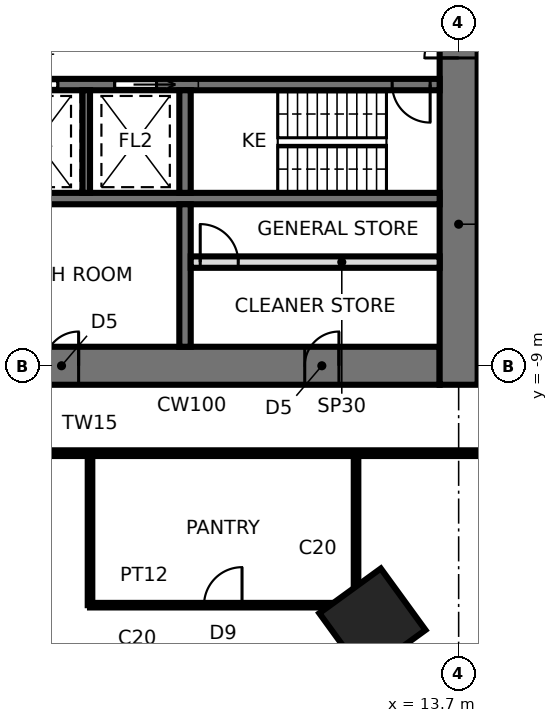
"""IFC4 building model, lengths in metres.
Left out: names, types, materials, properties, quantities, classifications, styles, units other than length and angle.
Written with IfcOpenShell. Run it as: python <this file> out.ifc"""

import sys

from ifc_helpers import new_model, si_unit, direction, frame, frame_2d, origin, origin_2d, place, context, subcontext, project, spatial, rectangle, extrude, element, fill, save


model = new_model("IFC4")
c1 = context("Model", 3, precision=1e-05, world=origin(), true_north=direction((0.0, 1.0)))
c2 = subcontext(c1, "Body", "Model", "MODEL_VIEW")
j1 = project(units=[si_unit("LENGTHUNIT", "METRE"), si_unit("PLANEANGLEUNIT", "RADIAN")], contexts=[c1])
p1 = place(None, origin())
s1 = spatial("IfcSite", under=j1, at=p1, CompositionType="ELEMENT")
p2 = place(p1, origin())
s2 = spatial("IfcBuilding", under=s1, at=p2, CompositionType="ELEMENT")
p3 = place(p2, frame((0.0, 0.0, 32.2)))
s3 = spatial("IfcBuildingStorey", under=s2, at=p3, CompositionType="ELEMENT", Elevation=32.2)
p4 = place(p3, frame((11.43, -15.733, 0.0), z_axis=(0.0, 0.0, 1.0), x_axis=(0.587785252292, -0.809016994375, 0.0)))
e1 = element("IfcColumn", 1, at=p4, inside=s3, PredefinedType="COLUMN", context=c2, shape_type="SweptSolid", body=[
    extrude(rectangle(XDim=2.0, YDim=2.0, at=origin_2d()), origin(), (0.0, 0.0, 1.0), 4.2),
])
p5 = place(p3, frame((-13.2, -9.0, 0.0), z_axis=(0.0, 0.0, 1.0), x_axis=(1.0, 0.0, 0.0)))
e2 = element("IfcWall", 2, at=p5, inside=s3, PredefinedType="SHEAR", context=c2, shape_type="SweptSolid", body=[
    extrude(rectangle(XDim=26.4, YDim=1.0, at=frame_2d((13.2, 0.0))), origin(), (0.0, 0.0, 1.0), 4.2),
])
p6 = place(p5, frame((2.65, 0.0, 0.0)))
e3 = element("IfcOpeningElement", 3, at=p6, cuts=e2, PredefinedType="OPENING", context=c2, shape_type="SweptSolid", body=[
    extrude(rectangle(XDim=0.9, YDim=2.1, at=frame_2d((0.45, 1.05))), frame((0.0, 0.51, 0.0), z_axis=(0.0, -1.0, 0.0), x_axis=(1.0, 0.0, 0.0)), (0.0, 0.0, 1.0), 1.02),
])
p7 = place(p5, frame((9.5, 0.0, 0.0)))
e4 = element("IfcOpeningElement", 4, at=p7, cuts=e2, PredefinedType="OPENING", context=c2, shape_type="SweptSolid", body=[
    extrude(rectangle(XDim=0.9, YDim=2.1, at=frame_2d((0.45, 1.05))), frame((0.0, 0.51, 0.0), z_axis=(0.0, -1.0, 0.0), x_axis=(1.0, 0.0, 0.0)), (0.0, 0.0, 1.0), 1.02),
])
p8 = place(p5, frame((16.0, 0.0, 0.0)))
e5 = element("IfcOpeningElement", 5, at=p8, cuts=e2, PredefinedType="OPENING", context=c2, shape_type="SweptSolid", body=[
    extrude(rectangle(XDim=0.9, YDim=2.1, at=frame_2d((0.45, 1.05))), frame((0.0, 0.51, 0.0), z_axis=(0.0, -1.0, 0.0), x_axis=(1.0, 0.0, 0.0)), (0.0, 0.0, 1.0), 1.02),
])
p9 = place(p5, frame((22.85, 0.0, 0.0)))
e6 = element("IfcOpeningElement", 6, at=p9, cuts=e2, PredefinedType="OPENING", context=c2, shape_type="SweptSolid", body=[
    extrude(rectangle(XDim=0.9, YDim=2.1, at=frame_2d((0.45, 1.05))), frame((0.0, 0.51, 0.0), z_axis=(0.0, -1.0, 0.0), x_axis=(1.0, 0.0, 0.0)), (0.0, 0.0, 1.0), 1.02),
])
p10 = place(p3, frame((13.7, -9.5, 0.0), z_axis=(0.0, 0.0, 1.0), x_axis=(0.0, 1.0, 0.0)))
e7 = element("IfcWall", 7, at=p10, inside=s3, PredefinedType="SHEAR", context=c2, shape_type="SweptSolid", body=[
    extrude(rectangle(XDim=19.0, YDim=1.0, at=frame_2d((9.5, 0.0))), origin(), (0.0, 0.0, 1.0), 4.2),
])
p11 = place(p10, frame((8.6, 0.0, 0.0)))
e8 = element("IfcOpeningElement", 8, at=p11, cuts=e7, PredefinedType="OPENING", context=c2, shape_type="SweptSolid", body=[
    extrude(rectangle(XDim=1.8, YDim=2.4, at=frame_2d((0.9, 1.2))), frame((0.0, 0.51, 0.0), z_axis=(0.0, -1.0, 0.0), x_axis=(1.0, 0.0, 0.0)), (0.0, 0.0, 1.0), 1.02),
])
p12 = place(p3, frame((-13.2, -1.6, 0.0), z_axis=(0.0, 0.0, 1.0), x_axis=(1.0, 0.0, 0.0)))
e9 = element("IfcWall", 9, at=p12, inside=s3, PredefinedType="SHEAR", context=c2, shape_type="SweptSolid", body=[
    extrude(rectangle(XDim=26.4, YDim=0.3, at=frame_2d((13.2, 0.0))), origin(), (0.0, 0.0, 1.0), 4.2),
])
p13 = place(p12, frame((25.15, 0.0, 0.0)))
e10 = element("IfcOpeningElement", 10, at=p13, cuts=e9, PredefinedType="OPENING", context=c2, shape_type="SweptSolid", body=[
    extrude(rectangle(XDim=1.0, YDim=2.1, at=frame_2d((0.5, 1.05))), frame((0.0, 0.16, 0.0), z_axis=(0.0, -1.0, 0.0), x_axis=(1.0, 0.0, 0.0)), (0.0, 0.0, 1.0), 0.32),
])
p14 = place(p12, frame((15.25, 0.0, 0.0)))
e11 = element("IfcOpeningElement", 11, at=p14, cuts=e9, PredefinedType="OPENING", context=c2, shape_type="SweptSolid", body=[
    extrude(rectangle(XDim=1.1, YDim=2.3, at=frame_2d((0.55, 1.15))), frame((0.0, 0.16, 0.0), z_axis=(0.0, -1.0, 0.0), x_axis=(1.0, 0.0, 0.0)), (0.0, 0.0, 1.0), 0.32),
])
p15 = place(p12, frame((17.85, 0.0, 0.0)))
e12 = element("IfcOpeningElement", 12, at=p15, cuts=e9, PredefinedType="OPENING", context=c2, shape_type="SweptSolid", body=[
    extrude(rectangle(XDim=1.1, YDim=2.3, at=frame_2d((0.55, 1.15))), frame((0.0, 0.16, 0.0), z_axis=(0.0, -1.0, 0.0), x_axis=(1.0, 0.0, 0.0)), (0.0, 0.0, 1.0), 0.32),
])
p16 = place(p12, frame((5.55, 0.0, 0.0)))
e13 = element("IfcOpeningElement", 13, at=p16, cuts=e9, PredefinedType="OPENING", context=c2, shape_type="SweptSolid", body=[
    extrude(rectangle(XDim=0.9, YDim=2.1, at=frame_2d((0.45, 1.05))), frame((0.0, 0.16, 0.0), z_axis=(0.0, -1.0, 0.0), x_axis=(1.0, 0.0, 0.0)), (0.0, 0.0, 1.0), 0.32),
])
p17 = place(p3, frame((-13.2, -4.6, 0.0), z_axis=(0.0, 0.0, 1.0), x_axis=(1.0, 0.0, 0.0)))
e14 = element("IfcWall", 14, at=p17, inside=s3, PredefinedType="SHEAR", context=c2, shape_type="SweptSolid", body=[
    extrude(rectangle(XDim=26.4, YDim=0.3, at=frame_2d((13.2, 0.0))), origin(), (0.0, 0.0, 1.0), 4.2),
])
p18 = place(p3, frame((6.5, -1.75, 0.0), z_axis=(0.0, 0.0, 1.0), x_axis=(0.0, -1.0, 0.0)))
e15 = element("IfcWall", 15, at=p18, inside=s3, PredefinedType="SHEAR", context=c2, shape_type="SweptSolid", body=[
    extrude(rectangle(XDim=2.7, YDim=0.3, at=frame_2d((1.35, 0.0))), origin(), (0.0, 0.0, 1.0), 4.2),
])
p19 = place(p3, frame((6.5, -4.75, 0.0), z_axis=(0.0, 0.0, 1.0), x_axis=(0.0, -1.0, 0.0)))
e16 = element("IfcWall", 16, at=p19, inside=s3, PredefinedType="SHEAR", context=c2, shape_type="SweptSolid", body=[
    extrude(rectangle(XDim=3.75, YDim=0.3, at=frame_2d((1.875, 0.0))), origin(), (0.0, 0.0, 1.0), 4.2),
])
p20 = place(p3, frame((3.9, -1.75, 0.0), z_axis=(0.0, 0.0, 1.0), x_axis=(0.0, -1.0, 0.0)))
e17 = element("IfcWall", 17, at=p20, inside=s3, PredefinedType="SHEAR", context=c2, shape_type="SweptSolid", body=[
    extrude(rectangle(XDim=2.7, YDim=0.2, at=frame_2d((1.35, 0.0))), origin(), (0.0, 0.0, 1.0), 4.2),
])
p21 = place(p3, frame((6.65, -6.272, 0.0), z_axis=(0.0, 0.0, 1.0), x_axis=(1.0, 0.0, 0.0)))
e18 = element("IfcWall", 18, at=p21, inside=s3, PredefinedType="PARTITIONING", context=c2, shape_type="SweptSolid", body=[
    extrude(rectangle(XDim=6.55, YDim=0.3, at=frame_2d((3.275, 0.0))), origin(), (0.0, 0.0, 1.0), 4.04),
])
p22 = place(p21, frame((0.25, 0.0, 0.0)))
e19 = element("IfcOpeningElement", 19, at=p22, cuts=e18, PredefinedType="OPENING", context=c2, shape_type="SweptSolid", body=[
    extrude(rectangle(XDim=1.0, YDim=2.4, at=frame_2d((0.5, 1.2))), frame((0.0, 0.16, 0.0), z_axis=(0.0, -1.0, 0.0), x_axis=(1.0, 0.0, 0.0)), (0.0, 0.0, 1.0), 0.32),
])
p23 = place(p3, frame((4.0, -11.3, 0.0), z_axis=(0.0, 0.0, 1.0), x_axis=(0.0, -1.0, 0.0)))
e20 = element("IfcWall", 20, at=p23, inside=s3, PredefinedType="PARTITIONING", context=c2, shape_type="SweptSolid", body=[
    extrude(rectangle(XDim=4.0, YDim=0.12, at=frame_2d((2.0, 0.0))), origin(), (0.0, 0.0, 1.0), 4.04),
])
p24 = place(p3, frame((-8.0, -11.3, 0.0), z_axis=(0.0, 0.0, 1.0), x_axis=(1.0, 0.0, 0.0)))
e21 = element("IfcWall", 21, at=p24, inside=s3, PredefinedType="PARTITIONING", context=c2, shape_type="SweptSolid", body=[
    extrude(rectangle(XDim=24.0, YDim=0.15, at=frame_2d((12.0, 0.0))), origin(), (0.0, 0.0, 1.0), 4.04),
])
p25 = place(p3, frame((4.0, -15.3, 0.0), z_axis=(0.0, 0.0, 1.0), x_axis=(1.0, 0.0, 0.0)))
e22 = element("IfcWall", 22, at=p25, inside=s3, PredefinedType="PARTITIONING", context=c2, shape_type="SweptSolid", body=[
    extrude(rectangle(XDim=7.0, YDim=0.12, at=frame_2d((3.5, 0.0))), origin(), (0.0, 0.0, 1.0), 3.586),
])
p26 = place(p25, frame((3.0, 0.0, 0.0)))
e23 = element("IfcOpeningElement", 23, at=p26, cuts=e22, PredefinedType="OPENING", context=c2, shape_type="SweptSolid", body=[
    extrude(rectangle(XDim=1.0, YDim=2.4, at=frame_2d((0.5, 1.2))), frame((0.0, 0.07, 0.0), z_axis=(0.0, -1.0, 0.0), x_axis=(1.0, 0.0, 0.0)), (0.0, 0.0, 1.0), 0.14),
])
p27 = place(p3, frame((11.0, -15.3, 0.0), z_axis=(0.0, 0.0, 1.0), x_axis=(0.0, 1.0, 0.0)))
e24 = element("IfcWall", 24, at=p27, inside=s3, PredefinedType="PARTITIONING", context=c2, shape_type="SweptSolid", body=[
    extrude(rectangle(XDim=4.0, YDim=0.12, at=frame_2d((2.0, 0.0))), origin(), (0.0, 0.0, 1.0), 4.04),
])
p28 = place(p11, origin())
e25 = element("IfcDoor", 25, at=p28, inside=s3, OperationType="DOUBLE_DOOR_SINGLE_SWING", PredefinedType="DOOR", context=c2, shape_type="SweptSolid", body=[
    extrude(rectangle(XDim=1.72, YDim=2.36, at=frame_2d((0.9, 1.18))), frame((0.0, 0.025, 0.0), z_axis=(0.0, -1.0, 0.0), x_axis=(1.0, 0.0, 0.0)), (0.0, 0.0, 1.0), 0.05),
    extrude(rectangle(XDim=0.04, YDim=2.4, at=frame_2d((0.02, 1.2))), frame((0.0, 0.25, 0.0), z_axis=(0.0, -1.0, 0.0), x_axis=(1.0, 0.0, 0.0)), (0.0, 0.0, 1.0), 0.5),
    extrude(rectangle(XDim=0.04, YDim=2.4, at=frame_2d((1.78, 1.2))), frame((0.0, 0.25, 0.0), z_axis=(0.0, -1.0, 0.0), x_axis=(1.0, 0.0, 0.0)), (0.0, 0.0, 1.0), 0.5),
    extrude(rectangle(XDim=1.72, YDim=0.04, at=frame_2d((0.9, 2.38))), frame((0.0, 0.25, 0.0), z_axis=(0.0, -1.0, 0.0), x_axis=(1.0, 0.0, 0.0)), (0.0, 0.0, 1.0), 0.5),
])
fill(e8, e25)
p29 = place(p13, frame((1.0, 0.0, 0.0), z_axis=(0.0, 0.0, 1.0), x_axis=(-1.0, 0.0, 0.0)))
e26 = element("IfcDoor", 26, at=p29, inside=s3, OperationType="SINGLE_SWING_LEFT", PredefinedType="DOOR", context=c2, shape_type="SweptSolid", body=[
    extrude(rectangle(XDim=1.0, YDim=2.1, at=frame_2d((0.5, 1.05))), frame((0.0, 0.025, 0.0), z_axis=(0.0, -1.0, 0.0), x_axis=(1.0, 0.0, 0.0)), (0.0, 0.0, 1.0), 0.05),
])
fill(e10, e26)
p30 = place(p14, frame((1.1, 0.0, 0.0), z_axis=(0.0, 0.0, 1.0), x_axis=(-1.0, 0.0, 0.0)))
e27 = element("IfcDoor", 27, at=p30, inside=s3, OperationType="SLIDING_TO_RIGHT", PredefinedType="DOOR", context=c2, shape_type="SweptSolid", body=[
    extrude(rectangle(XDim=1.1, YDim=2.3, at=frame_2d((0.55, 1.15))), frame((0.0, 0.025, 0.0), z_axis=(0.0, -1.0, 0.0), x_axis=(1.0, 0.0, 0.0)), (0.0, 0.0, 1.0), 0.05),
])
fill(e11, e27)
p31 = place(p15, frame((1.1, 0.0, 0.0), z_axis=(0.0, 0.0, 1.0), x_axis=(-1.0, 0.0, 0.0)))
e28 = element("IfcDoor", 28, at=p31, inside=s3, OperationType="SLIDING_TO_LEFT", PredefinedType="DOOR", context=c2, shape_type="SweptSolid", body=[
    extrude(rectangle(XDim=1.1, YDim=2.3, at=frame_2d((0.55, 1.15))), frame((0.0, 0.025, 0.0), z_axis=(0.0, -1.0, 0.0), x_axis=(1.0, 0.0, 0.0)), (0.0, 0.0, 1.0), 0.05),
])
fill(e12, e28)
p32 = place(p8, origin())
e29 = element("IfcDoor", 29, at=p32, inside=s3, OperationType="SINGLE_SWING_RIGHT", PredefinedType="DOOR", context=c2, shape_type="SweptSolid", body=[
    extrude(rectangle(XDim=0.82, YDim=2.06, at=frame_2d((0.45, 1.03))), frame((0.0, 0.025, 0.0), z_axis=(0.0, -1.0, 0.0), x_axis=(1.0, 0.0, 0.0)), (0.0, 0.0, 1.0), 0.05),
    extrude(rectangle(XDim=0.04, YDim=2.1, at=frame_2d((0.02, 1.05))), frame((0.0, 0.25, 0.0), z_axis=(0.0, -1.0, 0.0), x_axis=(1.0, 0.0, 0.0)), (0.0, 0.0, 1.0), 0.5),
    extrude(rectangle(XDim=0.04, YDim=2.1, at=frame_2d((0.88, 1.05))), frame((0.0, 0.25, 0.0), z_axis=(0.0, -1.0, 0.0), x_axis=(1.0, 0.0, 0.0)), (0.0, 0.0, 1.0), 0.5),
    extrude(rectangle(XDim=0.82, YDim=0.04, at=frame_2d((0.45, 2.08))), frame((0.0, 0.25, 0.0), z_axis=(0.0, -1.0, 0.0), x_axis=(1.0, 0.0, 0.0)), (0.0, 0.0, 1.0), 0.5),
])
fill(e5, e29)
p33 = place(p9, origin())
e30 = element("IfcDoor", 30, at=p33, inside=s3, OperationType="SINGLE_SWING_RIGHT", PredefinedType="DOOR", context=c2, shape_type="SweptSolid", body=[
    extrude(rectangle(XDim=0.82, YDim=2.06, at=frame_2d((0.45, 1.03))), frame((0.0, 0.025, 0.0), z_axis=(0.0, -1.0, 0.0), x_axis=(1.0, 0.0, 0.0)), (0.0, 0.0, 1.0), 0.05),
    extrude(rectangle(XDim=0.04, YDim=2.1, at=frame_2d((0.02, 1.05))), frame((0.0, 0.25, 0.0), z_axis=(0.0, -1.0, 0.0), x_axis=(1.0, 0.0, 0.0)), (0.0, 0.0, 1.0), 0.5),
    extrude(rectangle(XDim=0.04, YDim=2.1, at=frame_2d((0.88, 1.05))), frame((0.0, 0.25, 0.0), z_axis=(0.0, -1.0, 0.0), x_axis=(1.0, 0.0, 0.0)), (0.0, 0.0, 1.0), 0.5),
    extrude(rectangle(XDim=0.82, YDim=0.04, at=frame_2d((0.45, 2.08))), frame((0.0, 0.25, 0.0), z_axis=(0.0, -1.0, 0.0), x_axis=(1.0, 0.0, 0.0)), (0.0, 0.0, 1.0), 0.5),
])
fill(e6, e30)
p34 = place(p22, origin())
e31 = element("IfcDoor", 31, at=p34, inside=s3, OperationType="SINGLE_SWING_LEFT", PredefinedType="DOOR", context=c2, shape_type="SweptSolid", body=[
    extrude(rectangle(XDim=1.0, YDim=2.4, at=frame_2d((0.5, 1.2))), frame((0.0, 0.025, 0.0), z_axis=(0.0, -1.0, 0.0), x_axis=(1.0, 0.0, 0.0)), (0.0, 0.0, 1.0), 0.05),
])
fill(e19, e31)
p35 = place(p26, origin())
e32 = element("IfcDoor", 32, at=p35, inside=s3, OperationType="SINGLE_SWING_RIGHT", PredefinedType="DOOR", context=c2, shape_type="SweptSolid", body=[
    extrude(rectangle(XDim=1.0, YDim=2.4, at=frame_2d((0.5, 1.2))), frame((0.0, 0.025, 0.0), z_axis=(0.0, -1.0, 0.0), x_axis=(1.0, 0.0, 0.0)), (0.0, 0.0, 1.0), 0.05),
])
fill(e23, e32)
save(model, sys.argv[1])
